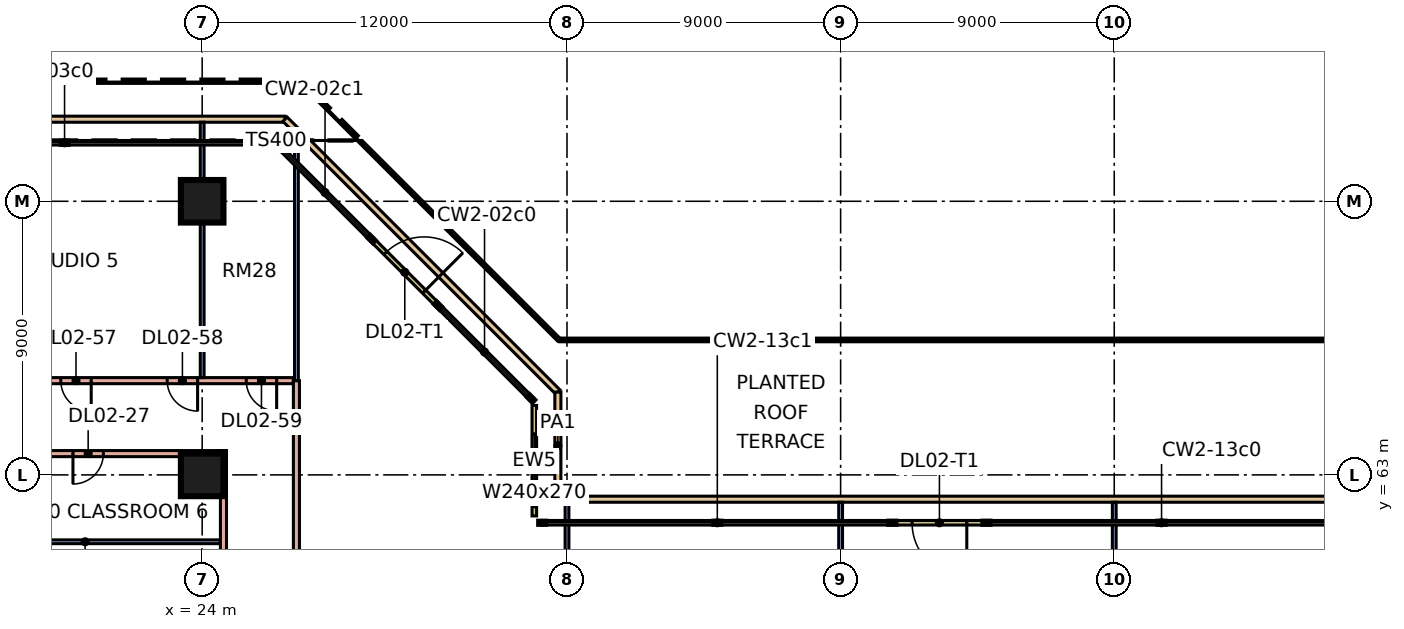
"""IFC4 building model, lengths in metres.
Left out: names, types, materials, properties, quantities, classifications, styles, units other than length and angle.
Written with IfcOpenShell. Run it as: python <this file> out.ifc"""

import sys

from ifc_helpers import new_model, si_unit, direction, frame, frame_2d, origin, origin_2d, place, context, subcontext, project, spatial, rectangle, extrude, element, fill, save


model = new_model("IFC4")
c1 = context("Model", 3, precision=1e-05, world=origin(), true_north=direction((0.0, 1.0)))
c2 = subcontext(c1, "Body", "Model", "MODEL_VIEW")
j1 = project(units=[si_unit("LENGTHUNIT", "METRE"), si_unit("PLANEANGLEUNIT", "RADIAN")], contexts=[c1])
p1 = place(None, origin())
s1 = spatial("IfcSite", under=j1, at=p1, CompositionType="ELEMENT")
p2 = place(p1, origin())
s2 = spatial("IfcBuilding", under=s1, at=p2, CompositionType="ELEMENT")
p3 = place(p2, frame((0.0, 0.0, 12.0)))
s3 = spatial("IfcBuildingStorey", under=s2, at=p3, CompositionType="ELEMENT", Elevation=12.0)
for number, where, z_axis, x_axis in (
    (1, (24.0, 63.0, 0.0), (0.0, 0.0, 1.0), (1.0, 0.0, 0.0)),
    (2, (24.0, 72.0, 0.0), (0.0, 0.0, 1.0), (1.0, 0.0, 0.0)),
):
    element("IfcColumn", number, at=place(p3, frame(where, z_axis=z_axis, x_axis=x_axis)), inside=s3, PredefinedType="COLUMN", context=c2, shape_type="SweptSolid", body=[
        extrude(rectangle(XDim=1.4, YDim=1.4, at=origin_2d()), origin(), (0.0, 0.0, 1.0), 4.8),
    ])
p4 = place(p3, frame((34.925, 61.65, 0.0), z_axis=(0.0, 0.0, 1.0), x_axis=(0.0, 1.0, 0.0)))
e3 = element("IfcWall", 3, at=p4, inside=s3, PredefinedType="SOLIDWALL", context=c2, shape_type="SweptSolid", body=[
    extrude(rectangle(XDim=3.635, YDim=0.15, at=frame_2d((1.817, 0.0))), origin(), (0.0, 0.0, 1.0), 4.4),
])
p5 = place(p4, frame((0.3, 0.0, 0.9)))
e4 = element("IfcOpeningElement", 4, at=p5, cuts=e3, PredefinedType="OPENING", context=c2, shape_type="SweptSolid", body=[
    extrude(rectangle(XDim=2.4, YDim=2.7, at=frame_2d((1.2, 1.35))), frame((0.0, 0.085, 0.0), z_axis=(0.0, -1.0, 0.0), x_axis=(1.0, 0.0, 0.0)), (0.0, 0.0, 1.0), 0.17),
])
p6 = place(p3, frame((31.725, 68.604, 0.0), z_axis=(0.0, 0.0, 1.0), x_axis=(-0.707106781187, 0.707106781187, 0.0)))
e5 = element("IfcWall", 5, at=p6, inside=s3, PredefinedType="SOLIDWALL", context=c2, shape_type="SweptSolid", body=[
    extrude(rectangle(XDim=3.0, YDim=0.15, at=frame_2d((1.5, 0.0))), origin(), (0.0, 0.0, 1.0), 4.4),
])
p7 = place(p6, frame((0.6, 0.0, 0.0)))
e6 = element("IfcOpeningElement", 6, at=p7, cuts=e5, PredefinedType="OPENING", context=c2, shape_type="SweptSolid", body=[
    extrude(rectangle(XDim=1.8, YDim=2.4, at=frame_2d((0.9, 1.2))), frame((0.0, 0.085, 0.0), z_axis=(0.0, -1.0, 0.0), x_axis=(1.0, 0.0, 0.0)), (0.0, 0.0, 1.0), 0.17),
])
p8 = place(p3, frame((49.75, 61.425, 0.0), z_axis=(0.0, 0.0, 1.0), x_axis=(-1.0, 0.0, 0.0)))
e7 = element("IfcWall", 7, at=p8, inside=s3, PredefinedType="SOLIDWALL", context=c2, shape_type="SweptSolid", body=[
    extrude(rectangle(XDim=3.0, YDim=0.15, at=frame_2d((1.5, 0.0))), origin(), (0.0, 0.0, 1.0), 4.4),
])
p9 = place(p8, frame((0.6, 0.0, 0.0)))
e8 = element("IfcOpeningElement", 8, at=p9, cuts=e7, PredefinedType="OPENING", context=c2, shape_type="SweptSolid", body=[
    extrude(rectangle(XDim=1.8, YDim=2.4, at=frame_2d((0.9, 1.2))), frame((0.0, 0.085, 0.0), z_axis=(0.0, -1.0, 0.0), x_axis=(1.0, 0.0, 0.0)), (0.0, 0.0, 1.0), 0.17),
])
p10 = place(p3, frame((35.7, 62.2, 0.0), z_axis=(0.0, 0.0, 1.0), x_axis=(1.0, 0.0, 0.0)))
e9 = element("IfcWall", 9, at=p10, inside=s3, PredefinedType="PARAPET", context=c2, shape_type="SweptSolid", body=[
    extrude(rectangle(XDim=26.5, YDim=0.2, at=frame_2d((13.25, 0.0))), origin(), (0.0, 0.0, 1.0), 0.5),
])
p11 = place(p3, frame((-2.725, 74.7, 0.0), z_axis=(0.0, 0.0, 1.0), x_axis=(1.0, 0.0, 0.0)))
e10 = element("IfcWall", 10, at=p11, inside=s3, PredefinedType="PARAPET", context=c2, shape_type="SweptSolid", body=[
    extrude(rectangle(XDim=29.45, YDim=0.2, at=frame_2d((14.725, 0.0))), origin(), (0.0, 0.0, 1.0), 0.5),
])
p12 = place(p3, frame((26.725, 74.7, 0.0), z_axis=(0.0, 0.0, 1.0), x_axis=(0.707106781187, -0.707106781187, 0.0)))
e11 = element("IfcWall", 11, at=p12, inside=s3, PredefinedType="PARAPET", context=c2, shape_type="SweptSolid", body=[
    extrude(rectangle(XDim=12.692, YDim=0.2, at=frame_2d((6.346, 0.0))), origin(), (0.0, 0.0, 1.0), 0.5),
])
p13 = place(p3, frame((35.7, 65.725, 0.0), z_axis=(0.0, 0.0, 1.0), x_axis=(0.0, -1.0, 0.0)))
e12 = element("IfcWall", 12, at=p13, inside=s3, PredefinedType="PARAPET", context=c2, shape_type="SweptSolid", body=[
    extrude(rectangle(XDim=3.525, YDim=0.2, at=frame_2d((1.763, 0.0))), origin(), (0.0, 0.0, 1.0), 0.5),
])
p14 = place(p3, frame((-3.0, 66.1, 0.0), z_axis=(0.0, 0.0, 1.0), x_axis=(1.0, 0.0, 0.0)))
e13 = element("IfcWall", 13, at=p14, inside=s3, PredefinedType="PARTITIONING", context=c2, shape_type="SweptSolid", body=[
    extrude(rectangle(XDim=30.0, YDim=0.2, at=frame_2d((15.0, 0.0))), origin(), (0.0, 0.0, 1.0), 4.4),
])
p15 = place(p14, frame((0.65, 0.0, 0.0)))
e14 = element("IfcOpeningElement", 14, at=p15, cuts=e13, PredefinedType="OPENING", context=c2, shape_type="SweptSolid", body=[
    extrude(rectangle(XDim=1.0, YDim=2.1, at=frame_2d((0.5, 1.05))), frame((0.0, 0.11, 0.0), z_axis=(0.0, -1.0, 0.0), x_axis=(1.0, 0.0, 0.0)), (0.0, 0.0, 1.0), 0.22),
])
p16 = place(p14, frame((8.6, 0.0, 0.0)))
e15 = element("IfcOpeningElement", 15, at=p16, cuts=e13, PredefinedType="OPENING", context=c2, shape_type="SweptSolid", body=[
    extrude(rectangle(XDim=1.0, YDim=2.1, at=frame_2d((0.5, 1.05))), frame((0.0, 0.11, 0.0), z_axis=(0.0, -1.0, 0.0), x_axis=(1.0, 0.0, 0.0)), (0.0, 0.0, 1.0), 0.22),
])
p17 = place(p14, frame((13.85, 0.0, 0.0)))
e16 = element("IfcOpeningElement", 16, at=p17, cuts=e13, PredefinedType="OPENING", context=c2, shape_type="SweptSolid", body=[
    extrude(rectangle(XDim=1.0, YDim=2.1, at=frame_2d((0.5, 1.05))), frame((0.0, 0.11, 0.0), z_axis=(0.0, -1.0, 0.0), x_axis=(1.0, 0.0, 0.0)), (0.0, 0.0, 1.0), 0.22),
])
p18 = place(p14, frame((22.35, 0.0, 0.0)))
e17 = element("IfcOpeningElement", 17, at=p18, cuts=e13, PredefinedType="OPENING", context=c2, shape_type="SweptSolid", body=[
    extrude(rectangle(XDim=1.0, YDim=2.1, at=frame_2d((0.5, 1.05))), frame((0.0, 0.11, 0.0), z_axis=(0.0, -1.0, 0.0), x_axis=(1.0, 0.0, 0.0)), (0.0, 0.0, 1.0), 0.22),
])
p19 = place(p14, frame((25.85, 0.0, 0.0)))
e18 = element("IfcOpeningElement", 18, at=p19, cuts=e13, PredefinedType="OPENING", context=c2, shape_type="SweptSolid", body=[
    extrude(rectangle(XDim=1.0, YDim=2.1, at=frame_2d((0.5, 1.05))), frame((0.0, 0.11, 0.0), z_axis=(0.0, -1.0, 0.0), x_axis=(1.0, 0.0, 0.0)), (0.0, 0.0, 1.0), 0.22),
])
p20 = place(p14, frame((28.45, 0.0, 0.0)))
e19 = element("IfcOpeningElement", 19, at=p20, cuts=e13, PredefinedType="OPENING", context=c2, shape_type="SweptSolid", body=[
    extrude(rectangle(XDim=1.0, YDim=2.1, at=frame_2d((0.5, 1.05))), frame((0.0, 0.11, 0.0), z_axis=(0.0, -1.0, 0.0), x_axis=(1.0, 0.0, 0.0)), (0.0, 0.0, 1.0), 0.22),
])
p21 = place(p3, frame((15.7, 60.8, 0.0), z_axis=(0.0, 0.0, 1.0), x_axis=(1.0, 0.0, 0.0)))
e20 = element("IfcWall", 20, at=p21, inside=s3, PredefinedType="PARTITIONING", context=c2, shape_type="SweptSolid", body=[
    extrude(rectangle(XDim=8.9, YDim=0.125, at=frame_2d((4.45, 0.0))), origin(), (0.0, 0.0, 1.0), 4.4),
])
p22 = place(p3, frame((15.7, 63.7, 0.0), z_axis=(0.0, 0.0, 1.0), x_axis=(1.0, 0.0, 0.0)))
e21 = element("IfcWall", 21, at=p22, inside=s3, PredefinedType="PARTITIONING", context=c2, shape_type="SweptSolid", body=[
    extrude(rectangle(XDim=8.9, YDim=0.2, at=frame_2d((4.45, 0.0))), origin(), (0.0, 0.0, 1.0), 4.4),
])
p23 = place(p22, frame((4.05, 0.0, 0.0)))
e22 = element("IfcOpeningElement", 22, at=p23, cuts=e21, PredefinedType="OPENING", context=c2, shape_type="SweptSolid", body=[
    extrude(rectangle(XDim=1.0, YDim=2.1, at=frame_2d((0.5, 1.05))), frame((0.0, 0.11, 0.0), z_axis=(0.0, -1.0, 0.0), x_axis=(1.0, 0.0, 0.0)), (0.0, 0.0, 1.0), 0.22),
])
p24 = place(p3, frame((24.0, 66.2, 0.0), z_axis=(0.0, 0.0, 1.0), x_axis=(0.0, 1.0, 0.0)))
e23 = element("IfcWall", 23, at=p24, inside=s3, PredefinedType="PARTITIONING", context=c2, shape_type="SweptSolid", body=[
    extrude(rectangle(XDim=8.4, YDim=0.125, at=frame_2d((4.2, 0.0))), origin(), (0.0, 0.0, 1.0), 4.4),
])
p25 = place(p3, frame((24.7, 44.3, 0.0), z_axis=(0.0, 0.0, 1.0), x_axis=(0.0, 1.0, 0.0)))
e24 = element("IfcWall", 24, at=p25, inside=s3, PredefinedType="PARTITIONING", context=c2, shape_type="SweptSolid", body=[
    extrude(rectangle(XDim=19.5, YDim=0.2, at=frame_2d((9.75, 0.0))), origin(), (0.0, 0.0, 1.0), 4.4),
])
p26 = place(p25, frame((1.45, 0.0, 0.0)))
e25 = element("IfcOpeningElement", 25, at=p26, cuts=e24, PredefinedType="OPENING", context=c2, shape_type="SweptSolid", body=[
    extrude(rectangle(XDim=1.0, YDim=2.1, at=frame_2d((0.5, 1.05))), frame((0.0, 0.11, 0.0), z_axis=(0.0, -1.0, 0.0), x_axis=(1.0, 0.0, 0.0)), (0.0, 0.0, 1.0), 0.22),
])
p27 = place(p25, frame((6.65, 0.0, 0.0)))
e26 = element("IfcOpeningElement", 26, at=p27, cuts=e24, PredefinedType="OPENING", context=c2, shape_type="SweptSolid", body=[
    extrude(rectangle(XDim=1.0, YDim=2.1, at=frame_2d((0.5, 1.05))), frame((0.0, 0.11, 0.0), z_axis=(0.0, -1.0, 0.0), x_axis=(1.0, 0.0, 0.0)), (0.0, 0.0, 1.0), 0.22),
])
p28 = place(p3, frame((27.1, 38.5, 0.0), z_axis=(0.0, 0.0, 1.0), x_axis=(0.0, 1.0, 0.0)))
e27 = element("IfcWall", 27, at=p28, inside=s3, PredefinedType="PARTITIONING", context=c2, shape_type="SweptSolid", body=[
    extrude(rectangle(XDim=27.6, YDim=0.2, at=frame_2d((13.8, 0.0))), origin(), (0.0, 0.0, 1.0), 4.4),
])
p29 = place(p28, frame((13.05, 0.0, 0.0)))
e28 = element("IfcOpeningElement", 28, at=p29, cuts=e27, PredefinedType="OPENING", context=c2, shape_type="SweptSolid", body=[
    extrude(rectangle(XDim=1.8, YDim=2.1, at=frame_2d((0.9, 1.05))), frame((0.0, 0.11, 0.0), z_axis=(0.0, -1.0, 0.0), x_axis=(1.0, 0.0, 0.0)), (0.0, 0.0, 1.0), 0.22),
])
p30 = place(p28, frame((3.05, 0.0, 0.0)))
e29 = element("IfcOpeningElement", 29, at=p30, cuts=e27, PredefinedType="OPENING", context=c2, shape_type="SweptSolid", body=[
    extrude(rectangle(XDim=1.8, YDim=2.1, at=frame_2d((0.9, 1.05))), frame((0.0, 0.11, 0.0), z_axis=(0.0, -1.0, 0.0), x_axis=(1.0, 0.0, 0.0)), (0.0, 0.0, 1.0), 0.22),
])
p31 = place(p3, frame((27.1, 66.1, 0.0), z_axis=(0.0, 0.0, 1.0), x_axis=(0.0, 1.0, 0.0)))
e30 = element("IfcWall", 30, at=p31, inside=s3, PredefinedType="PARTITIONING", context=c2, shape_type="SweptSolid", body=[
    extrude(rectangle(XDim=8.083, YDim=0.125, at=frame_2d((4.042, 0.0))), origin(), (0.0, 0.0, 1.0), 4.4),
])
p32 = place(p3, frame((36.0, 41.4, 0.0), z_axis=(0.0, 0.0, 1.0), x_axis=(0.0, 1.0, 0.0)))
e31 = element("IfcWall", 31, at=p32, inside=s3, PredefinedType="PARTITIONING", context=c2, shape_type="SweptSolid", body=[
    extrude(rectangle(XDim=20.7, YDim=0.125, at=frame_2d((10.35, 0.0))), origin(), (0.0, 0.0, 1.0), 4.4),
])
for number, where, z_axis, x_axis in (
    (32, (45.0, 41.5, 0.0), (0.0, 0.0, 1.0), (0.0, 1.0, 0.0)),
    (33, (54.0, 41.5, 0.0), (0.0, 0.0, 1.0), (0.0, 1.0, 0.0)),
):
    element("IfcWall", number, at=place(p3, frame(where, z_axis=z_axis, x_axis=x_axis)), inside=s3, PredefinedType="PARTITIONING", context=c2, shape_type="SweptSolid", body=[
        extrude(rectangle(XDim=20.6, YDim=0.125, at=frame_2d((10.3, 0.0))), origin(), (0.0, 0.0, 1.0), 4.4),
    ])
p33 = place(p5, origin())
e34 = element("IfcWindow", 34, at=p33, inside=s3, PartitioningType="SINGLE_PANEL", PredefinedType="WINDOW", context=c2, shape_type="SweptSolid", body=[
    extrude(rectangle(XDim=2.4, YDim=2.7, at=frame_2d((1.2, 1.35))), frame((0.0, 0.03, 0.0), z_axis=(0.0, -1.0, 0.0), x_axis=(1.0, 0.0, 0.0)), (0.0, 0.0, 1.0), 0.06),
])
fill(e4, e34)
p34 = place(p7, frame((1.8, 0.0, 0.0), z_axis=(0.0, 0.0, 1.0), x_axis=(-1.0, 0.0, 0.0)))
e35 = element("IfcDoor", 35, at=p34, inside=s3, OperationType="DOUBLE_DOOR_SINGLE_SWING", PredefinedType="DOOR", context=c2, shape_type="SweptSolid", body=[
    extrude(rectangle(XDim=1.8, YDim=2.4, at=frame_2d((0.9, 1.2))), frame((0.0, 0.025, 0.0), z_axis=(0.0, -1.0, 0.0), x_axis=(1.0, 0.0, 0.0)), (0.0, 0.0, 1.0), 0.05),
])
fill(e6, e35)
p35 = place(p9, origin())
e36 = element("IfcDoor", 36, at=p35, inside=s3, OperationType="DOUBLE_DOOR_SINGLE_SWING", PredefinedType="DOOR", context=c2, shape_type="SweptSolid", body=[
    extrude(rectangle(XDim=1.8, YDim=2.4, at=frame_2d((0.9, 1.2))), frame((0.0, 0.025, 0.0), z_axis=(0.0, -1.0, 0.0), x_axis=(1.0, 0.0, 0.0)), (0.0, 0.0, 1.0), 0.05),
])
fill(e8, e36)
p36 = place(p23, frame((1.0, 0.0, 0.0), z_axis=(0.0, 0.0, 1.0), x_axis=(-1.0, 0.0, 0.0)))
e37 = element("IfcDoor", 37, at=p36, inside=s3, OperationType="SINGLE_SWING_LEFT", PredefinedType="DOOR", context=c2, shape_type="SweptSolid", body=[
    extrude(rectangle(XDim=1.0, YDim=2.1, at=frame_2d((0.5, 1.05))), frame((0.0, 0.025, 0.0), z_axis=(0.0, -1.0, 0.0), x_axis=(1.0, 0.0, 0.0)), (0.0, 0.0, 1.0), 0.05),
])
fill(e22, e37)
p37 = place(p18, origin())
e38 = element("IfcDoor", 38, at=p37, inside=s3, OperationType="SINGLE_SWING_RIGHT", PredefinedType="DOOR", context=c2, shape_type="SweptSolid", body=[
    extrude(rectangle(XDim=1.0, YDim=2.1, at=frame_2d((0.5, 1.05))), frame((0.0, 0.025, 0.0), z_axis=(0.0, -1.0, 0.0), x_axis=(1.0, 0.0, 0.0)), (0.0, 0.0, 1.0), 0.05),
])
fill(e17, e38)
p38 = place(p19, origin())
e39 = element("IfcDoor", 39, at=p38, inside=s3, OperationType="SINGLE_SWING_RIGHT", PredefinedType="DOOR", context=c2, shape_type="SweptSolid", body=[
    extrude(rectangle(XDim=1.0, YDim=2.1, at=frame_2d((0.5, 1.05))), frame((0.0, 0.025, 0.0), z_axis=(0.0, -1.0, 0.0), x_axis=(1.0, 0.0, 0.0)), (0.0, 0.0, 1.0), 0.05),
])
fill(e18, e39)
p39 = place(p20, origin())
e40 = element("IfcDoor", 40, at=p39, inside=s3, OperationType="SINGLE_SWING_RIGHT", PredefinedType="DOOR", context=c2, shape_type="SweptSolid", body=[
    extrude(rectangle(XDim=1.0, YDim=2.1, at=frame_2d((0.5, 1.05))), frame((0.0, 0.025, 0.0), z_axis=(0.0, -1.0, 0.0), x_axis=(1.0, 0.0, 0.0)), (0.0, 0.0, 1.0), 0.05),
])
fill(e19, e40)
save(model, sys.argv[1])
